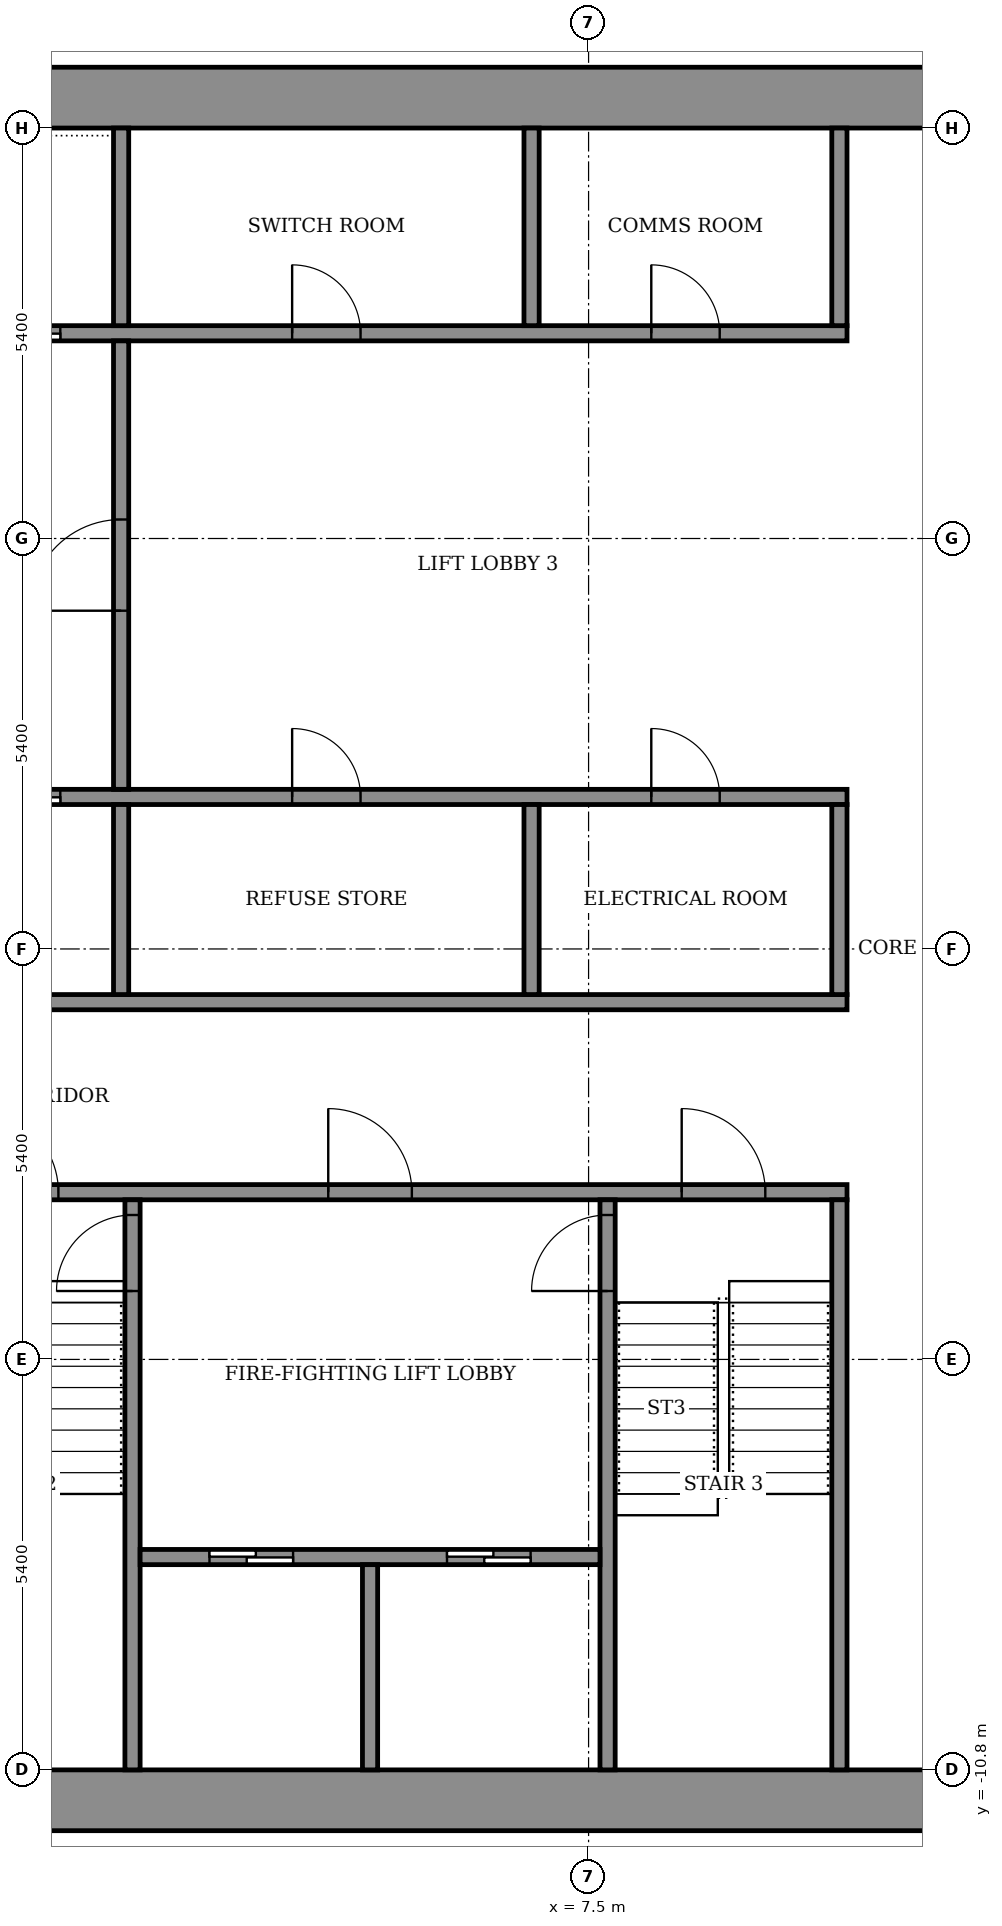
"""IFC4 building model, lengths in metres.
Left out: names, types, materials, properties, quantities, classifications, styles, units other than length and angle.
Written with IfcOpenShell. Run it as: python <this file> out.ifc"""

import sys

from ifc_helpers import new_model, si_unit, direction, frame, frame_2d, origin, place, context, subcontext, project, spatial, rectangle, extrude, element, fill, save


model = new_model("IFC4")
c1 = context("Model", 3, precision=1e-05, world=origin(), true_north=direction((0.0, 1.0)))
c2 = subcontext(c1, "Body", "Model", "MODEL_VIEW")
j1 = project(units=[si_unit("LENGTHUNIT", "METRE"), si_unit("PLANEANGLEUNIT", "RADIAN")], contexts=[c1])
p1 = place(None, origin())
s1 = spatial("IfcSite", under=j1, at=p1, CompositionType="ELEMENT")
p2 = place(p1, origin())
s2 = spatial("IfcBuilding", under=s1, at=p2, CompositionType="ELEMENT")
p3 = place(p2, frame((0.0, 0.0, 249.1)))
s3 = spatial("IfcBuildingStorey", under=s2, at=p3, CompositionType="ELEMENT", Elevation=249.1)
for number, where, z_axis, x_axis in (
    (1, (-14.6, -11.2, 0.0), (0.0, 0.0, 1.0), (1.0, 0.0, 0.0)),
    (2, (-14.6, 11.2, 0.0), (0.0, 0.0, 1.0), (1.0, 0.0, 0.0)),
):
    element("IfcWall", number, at=place(p3, frame(where, z_axis=z_axis, x_axis=x_axis)), inside=s3, PredefinedType="SHEAR", context=c2, shape_type="SweptSolid", body=[
        extrude(rectangle(XDim=29.2, YDim=0.8, at=frame_2d((14.6, 0.0))), origin(), (0.0, 0.0, 1.0), 3.6),
    ])
p4 = place(p3, frame((-10.9, -3.2, 0.0), z_axis=(0.0, 0.0, 1.0), x_axis=(1.0, 0.0, 0.0)))
e3 = element("IfcWall", 3, at=p4, inside=s3, PredefinedType="SHEAR", context=c2, shape_type="SweptSolid", body=[
    extrude(rectangle(XDim=21.8, YDim=0.2, at=frame_2d((10.9, 0.0))), origin(), (0.0, 0.0, 1.0), 3.05),
])
p5 = place(p4, frame((1.075, 0.0, 0.0)))
e4 = element("IfcOpeningElement", 4, at=p5, cuts=e3, PredefinedType="OPENING", context=c2, shape_type="SweptSolid", body=[
    extrude(rectangle(XDim=1.1, YDim=2.1, at=frame_2d((0.55, 1.05))), frame((0.0, 0.11, 0.0), z_axis=(0.0, -1.0, 0.0), x_axis=(1.0, 0.0, 0.0)), (0.0, 0.0, 1.0), 0.22),
])
p6 = place(p4, frame((10.325, 0.0, 0.0)))
e5 = element("IfcOpeningElement", 5, at=p6, cuts=e3, PredefinedType="OPENING", context=c2, shape_type="SweptSolid", body=[
    extrude(rectangle(XDim=1.1, YDim=2.1, at=frame_2d((0.55, 1.05))), frame((0.0, 0.11, 0.0), z_axis=(0.0, -1.0, 0.0), x_axis=(1.0, 0.0, 0.0)), (0.0, 0.0, 1.0), 0.22),
])
p7 = place(p4, frame((19.625, 0.0, 0.0)))
e6 = element("IfcOpeningElement", 6, at=p7, cuts=e3, PredefinedType="OPENING", context=c2, shape_type="SweptSolid", body=[
    extrude(rectangle(XDim=1.1, YDim=2.1, at=frame_2d((0.55, 1.05))), frame((0.0, 0.11, 0.0), z_axis=(0.0, -1.0, 0.0), x_axis=(1.0, 0.0, 0.0)), (0.0, 0.0, 1.0), 0.22),
])
p8 = place(p4, frame((5.7, 0.0, 0.0)))
e7 = element("IfcOpeningElement", 7, at=p8, cuts=e3, PredefinedType="OPENING", context=c2, shape_type="SweptSolid", body=[
    extrude(rectangle(XDim=1.1, YDim=2.1, at=frame_2d((0.55, 1.05))), frame((0.0, 0.11, 0.0), z_axis=(0.0, -1.0, 0.0), x_axis=(1.0, 0.0, 0.0)), (0.0, 0.0, 1.0), 0.22),
])
p9 = place(p4, frame((14.975, 0.0, 0.0)))
e8 = element("IfcOpeningElement", 8, at=p9, cuts=e3, PredefinedType="OPENING", context=c2, shape_type="SweptSolid", body=[
    extrude(rectangle(XDim=1.1, YDim=2.1, at=frame_2d((0.55, 1.05))), frame((0.0, 0.11, 0.0), z_axis=(0.0, -1.0, 0.0), x_axis=(1.0, 0.0, 0.0)), (0.0, 0.0, 1.0), 0.22),
])
p10 = place(p3, frame((-10.9, -0.7, 0.0), z_axis=(0.0, 0.0, 1.0), x_axis=(1.0, 0.0, 0.0)))
e9 = element("IfcWall", 9, at=p10, inside=s3, PredefinedType="SHEAR", context=c2, shape_type="SweptSolid", body=[
    extrude(rectangle(XDim=21.8, YDim=0.2, at=frame_2d((10.9, 0.0))), origin(), (0.0, 0.0, 1.0), 3.05),
])
p11 = place(p3, frame((-10.9, 2.0, 0.0), z_axis=(0.0, 0.0, 1.0), x_axis=(1.0, 0.0, 0.0)))
e10 = element("IfcWall", 10, at=p11, inside=s3, PredefinedType="SHEAR", context=c2, shape_type="SweptSolid", body=[
    extrude(rectangle(XDim=21.8, YDim=0.2, at=frame_2d((10.9, 0.0))), origin(), (0.0, 0.0, 1.0), 3.05),
])
p12 = place(p11, frame((4.95, 0.0, 0.0)))
e11 = element("IfcOpeningElement", 11, at=p12, cuts=e10, PredefinedType="OPENING", context=c2, shape_type="SweptSolid", body=[
    extrude(rectangle(XDim=1.1, YDim=2.1, at=frame_2d((0.55, 1.05))), frame((0.0, 0.11, 0.0), z_axis=(0.0, -1.0, 0.0), x_axis=(1.0, 0.0, 0.0)), (0.0, 0.0, 1.0), 0.22),
])
p13 = place(p11, frame((7.65, 0.0, 0.0)))
e12 = element("IfcOpeningElement", 12, at=p13, cuts=e10, PredefinedType="OPENING", context=c2, shape_type="SweptSolid", body=[
    extrude(rectangle(XDim=1.1, YDim=2.1, at=frame_2d((0.55, 1.05))), frame((0.0, 0.11, 0.0), z_axis=(0.0, -1.0, 0.0), x_axis=(1.0, 0.0, 0.0)), (0.0, 0.0, 1.0), 0.22),
])
p14 = place(p11, frame((10.35, 0.0, 0.0)))
e13 = element("IfcOpeningElement", 13, at=p14, cuts=e10, PredefinedType="OPENING", context=c2, shape_type="SweptSolid", body=[
    extrude(rectangle(XDim=1.1, YDim=2.1, at=frame_2d((0.55, 1.05))), frame((0.0, 0.11, 0.0), z_axis=(0.0, -1.0, 0.0), x_axis=(1.0, 0.0, 0.0)), (0.0, 0.0, 1.0), 0.22),
])
p15 = place(p11, frame((1.675, 0.0, 0.0)))
e14 = element("IfcOpeningElement", 14, at=p15, cuts=e10, PredefinedType="OPENING", context=c2, shape_type="SweptSolid", body=[
    extrude(rectangle(XDim=0.9, YDim=2.1, at=frame_2d((0.45, 1.05))), frame((0.0, 0.11, 0.0), z_axis=(0.0, -1.0, 0.0), x_axis=(1.0, 0.0, 0.0)), (0.0, 0.0, 1.0), 0.22),
])
p16 = place(p11, frame((14.5, 0.0, 0.0)))
e15 = element("IfcOpeningElement", 15, at=p16, cuts=e10, PredefinedType="OPENING", context=c2, shape_type="SweptSolid", body=[
    extrude(rectangle(XDim=0.9, YDim=2.1, at=frame_2d((0.45, 1.05))), frame((0.0, 0.11, 0.0), z_axis=(0.0, -1.0, 0.0), x_axis=(1.0, 0.0, 0.0)), (0.0, 0.0, 1.0), 0.22),
])
p17 = place(p11, frame((19.225, 0.0, 0.0)))
e16 = element("IfcOpeningElement", 16, at=p17, cuts=e10, PredefinedType="OPENING", context=c2, shape_type="SweptSolid", body=[
    extrude(rectangle(XDim=0.9, YDim=2.1, at=frame_2d((0.45, 1.05))), frame((0.0, 0.11, 0.0), z_axis=(0.0, -1.0, 0.0), x_axis=(1.0, 0.0, 0.0)), (0.0, 0.0, 1.0), 0.22),
])
p18 = place(p3, frame((-10.9, 8.1, 0.0), z_axis=(0.0, 0.0, 1.0), x_axis=(1.0, 0.0, 0.0)))
e17 = element("IfcWall", 17, at=p18, inside=s3, PredefinedType="SHEAR", context=c2, shape_type="SweptSolid", body=[
    extrude(rectangle(XDim=21.8, YDim=0.2, at=frame_2d((10.9, 0.0))), origin(), (0.0, 0.0, 1.0), 3.05),
])
p19 = place(p18, frame((4.95, 0.0, 0.0)))
e18 = element("IfcOpeningElement", 18, at=p19, cuts=e17, PredefinedType="OPENING", context=c2, shape_type="SweptSolid", body=[
    extrude(rectangle(XDim=1.1, YDim=2.1, at=frame_2d((0.55, 1.05))), frame((0.0, 0.11, 0.0), z_axis=(0.0, -1.0, 0.0), x_axis=(1.0, 0.0, 0.0)), (0.0, 0.0, 1.0), 0.22),
])
p20 = place(p18, frame((7.65, 0.0, 0.0)))
e19 = element("IfcOpeningElement", 19, at=p20, cuts=e17, PredefinedType="OPENING", context=c2, shape_type="SweptSolid", body=[
    extrude(rectangle(XDim=1.1, YDim=2.1, at=frame_2d((0.55, 1.05))), frame((0.0, 0.11, 0.0), z_axis=(0.0, -1.0, 0.0), x_axis=(1.0, 0.0, 0.0)), (0.0, 0.0, 1.0), 0.22),
])
p21 = place(p18, frame((10.35, 0.0, 0.0)))
e20 = element("IfcOpeningElement", 20, at=p21, cuts=e17, PredefinedType="OPENING", context=c2, shape_type="SweptSolid", body=[
    extrude(rectangle(XDim=1.1, YDim=2.1, at=frame_2d((0.55, 1.05))), frame((0.0, 0.11, 0.0), z_axis=(0.0, -1.0, 0.0), x_axis=(1.0, 0.0, 0.0)), (0.0, 0.0, 1.0), 0.22),
])
p22 = place(p18, frame((1.675, 0.0, 0.0)))
e21 = element("IfcOpeningElement", 21, at=p22, cuts=e17, PredefinedType="OPENING", context=c2, shape_type="SweptSolid", body=[
    extrude(rectangle(XDim=0.9, YDim=2.1, at=frame_2d((0.45, 1.05))), frame((0.0, 0.11, 0.0), z_axis=(0.0, -1.0, 0.0), x_axis=(1.0, 0.0, 0.0)), (0.0, 0.0, 1.0), 0.22),
])
p23 = place(p18, frame((14.5, 0.0, 0.0)))
e22 = element("IfcOpeningElement", 22, at=p23, cuts=e17, PredefinedType="OPENING", context=c2, shape_type="SweptSolid", body=[
    extrude(rectangle(XDim=0.9, YDim=2.1, at=frame_2d((0.45, 1.05))), frame((0.0, 0.11, 0.0), z_axis=(0.0, -1.0, 0.0), x_axis=(1.0, 0.0, 0.0)), (0.0, 0.0, 1.0), 0.22),
])
p24 = place(p18, frame((19.225, 0.0, 0.0)))
e23 = element("IfcOpeningElement", 23, at=p24, cuts=e17, PredefinedType="OPENING", context=c2, shape_type="SweptSolid", body=[
    extrude(rectangle(XDim=0.9, YDim=2.1, at=frame_2d((0.45, 1.05))), frame((0.0, 0.11, 0.0), z_axis=(0.0, -1.0, 0.0), x_axis=(1.0, 0.0, 0.0)), (0.0, 0.0, 1.0), 0.22),
])
p25 = place(p3, frame((1.5, -10.8, 0.0), z_axis=(0.0, 0.0, 1.0), x_axis=(0.0, 1.0, 0.0)))
e24 = element("IfcWall", 24, at=p25, inside=s3, PredefinedType="SHEAR", context=c2, shape_type="SweptSolid", body=[
    extrude(rectangle(XDim=7.5, YDim=0.2, at=frame_2d((3.75, 0.0))), origin(), (0.0, 0.0, 1.0), 3.05),
])
p26 = place(p25, frame((6.3, 0.0, 0.0)))
e25 = element("IfcOpeningElement", 25, at=p26, cuts=e24, PredefinedType="OPENING", context=c2, shape_type="SweptSolid", body=[
    extrude(rectangle(XDim=1.0, YDim=2.1, at=frame_2d((0.5, 1.05))), frame((0.0, 0.11, 0.0), z_axis=(0.0, -1.0, 0.0), x_axis=(1.0, 0.0, 0.0)), (0.0, 0.0, 1.0), 0.22),
])
p27 = place(p3, frame((7.75, -10.8, 0.0), z_axis=(0.0, 0.0, 1.0), x_axis=(0.0, 1.0, 0.0)))
e26 = element("IfcWall", 26, at=p27, inside=s3, PredefinedType="SHEAR", context=c2, shape_type="SweptSolid", body=[
    extrude(rectangle(XDim=7.5, YDim=0.2, at=frame_2d((3.75, 0.0))), origin(), (0.0, 0.0, 1.0), 3.05),
])
p28 = place(p27, frame((6.3, 0.0, 0.0)))
e27 = element("IfcOpeningElement", 27, at=p28, cuts=e26, PredefinedType="OPENING", context=c2, shape_type="SweptSolid", body=[
    extrude(rectangle(XDim=1.0, YDim=2.1, at=frame_2d((0.5, 1.05))), frame((0.0, 0.11, 0.0), z_axis=(0.0, -1.0, 0.0), x_axis=(1.0, 0.0, 0.0)), (0.0, 0.0, 1.0), 0.22),
])
p29 = place(p3, frame((10.8, -10.8, 0.0), z_axis=(0.0, 0.0, 1.0), x_axis=(0.0, 1.0, 0.0)))
e28 = element("IfcWall", 28, at=p29, inside=s3, PredefinedType="SHEAR", context=c2, shape_type="SweptSolid", body=[
    extrude(rectangle(XDim=7.5, YDim=0.2, at=frame_2d((3.75, 0.0))), origin(), (0.0, 0.0, 1.0), 3.05),
])
p30 = place(p3, frame((1.6, -8.0, 0.0), z_axis=(0.0, 0.0, 1.0), x_axis=(1.0, 0.0, 0.0)))
e29 = element("IfcWall", 29, at=p30, inside=s3, PredefinedType="SHEAR", context=c2, shape_type="SweptSolid", body=[
    extrude(rectangle(XDim=6.05, YDim=0.2, at=frame_2d((3.025, 0.0))), origin(), (0.0, 0.0, 1.0), 3.05),
])
p31 = place(p30, frame((0.913, 0.0, 0.0)))
e30 = element("IfcOpeningElement", 30, at=p31, cuts=e29, PredefinedType="OPENING", context=c2, shape_type="SweptSolid", body=[
    extrude(rectangle(XDim=1.1, YDim=2.1, at=frame_2d((0.55, 1.05))), frame((0.0, 0.11, 0.0), z_axis=(0.0, -1.0, 0.0), x_axis=(1.0, 0.0, 0.0)), (0.0, 0.0, 1.0), 0.22),
])
p32 = place(p30, frame((4.038, 0.0, 0.0)))
e31 = element("IfcOpeningElement", 31, at=p32, cuts=e29, PredefinedType="OPENING", context=c2, shape_type="SweptSolid", body=[
    extrude(rectangle(XDim=1.1, YDim=2.1, at=frame_2d((0.55, 1.05))), frame((0.0, 0.11, 0.0), z_axis=(0.0, -1.0, 0.0), x_axis=(1.0, 0.0, 0.0)), (0.0, 0.0, 1.0), 0.22),
])
p33 = place(p3, frame((4.625, -10.8, 0.0), z_axis=(0.0, 0.0, 1.0), x_axis=(0.0, 1.0, 0.0)))
e32 = element("IfcWall", 32, at=p33, inside=s3, PredefinedType="SHEAR", context=c2, shape_type="SweptSolid", body=[
    extrude(rectangle(XDim=2.7, YDim=0.2, at=frame_2d((1.35, 0.0))), origin(), (0.0, 0.0, 1.0), 3.05),
])
p34 = place(p3, frame((1.35, -0.6, 0.0), z_axis=(0.0, 0.0, 1.0), x_axis=(0.0, 1.0, 0.0)))
e33 = element("IfcWall", 33, at=p34, inside=s3, PredefinedType="SHEAR", context=c2, shape_type="SweptSolid", body=[
    extrude(rectangle(XDim=2.5, YDim=0.2, at=frame_2d((1.25, 0.0))), origin(), (0.0, 0.0, 1.0), 3.05),
])
for number, where, z_axis, x_axis in (
    (34, (6.75, -0.6, 0.0), (0.0, 0.0, 1.0), (0.0, 1.0, 0.0)),
    (35, (10.8, -0.6, 0.0), (0.0, 0.0, 1.0), (0.0, 1.0, 0.0)),
):
    element("IfcWall", number, at=place(p3, frame(where, z_axis=z_axis, x_axis=x_axis)), inside=s3, PredefinedType="STANDARD", context=c2, shape_type="SweptSolid", body=[
        extrude(rectangle(XDim=2.5, YDim=0.2, at=frame_2d((1.25, 0.0))), origin(), (0.0, 0.0, 1.0), 3.05),
    ])
p35 = place(p3, frame((1.35, 8.2, 0.0), z_axis=(0.0, 0.0, 1.0), x_axis=(0.0, 1.0, 0.0)))
e36 = element("IfcWall", 36, at=p35, inside=s3, PredefinedType="SHEAR", context=c2, shape_type="SweptSolid", body=[
    extrude(rectangle(XDim=2.6, YDim=0.2, at=frame_2d((1.3, 0.0))), origin(), (0.0, 0.0, 1.0), 3.05),
])
for number, where, z_axis, x_axis in (
    (37, (6.75, 8.2, 0.0), (0.0, 0.0, 1.0), (0.0, 1.0, 0.0)),
    (38, (10.8, 8.2, 0.0), (0.0, 0.0, 1.0), (0.0, 1.0, 0.0)),
):
    element("IfcWall", number, at=place(p3, frame(where, z_axis=z_axis, x_axis=x_axis)), inside=s3, PredefinedType="STANDARD", context=c2, shape_type="SweptSolid", body=[
        extrude(rectangle(XDim=2.6, YDim=0.2, at=frame_2d((1.3, 0.0))), origin(), (0.0, 0.0, 1.0), 3.05),
    ])
p36 = place(p3, frame((1.35, 2.1, 0.0), z_axis=(0.0, 0.0, 1.0), x_axis=(0.0, 1.0, 0.0)))
e39 = element("IfcWall", 39, at=p36, inside=s3, PredefinedType="STANDARD", context=c2, shape_type="SweptSolid", body=[
    extrude(rectangle(XDim=5.9, YDim=0.2, at=frame_2d((2.95, 0.0))), origin(), (0.0, 0.0, 1.0), 3.05),
])
p37 = place(p36, frame((2.35, 0.0, 0.0)))
e40 = element("IfcOpeningElement", 40, at=p37, cuts=e39, PredefinedType="OPENING", context=c2, shape_type="SweptSolid", body=[
    extrude(rectangle(XDim=1.2, YDim=2.1, at=frame_2d((0.6, 1.05))), frame((0.0, 0.11, 0.0), z_axis=(0.0, -1.0, 0.0), x_axis=(1.0, 0.0, 0.0)), (0.0, 0.0, 1.0), 0.22),
])
p38 = place(p14, origin())
e41 = element("IfcDoor", 41, at=p38, inside=s3, OperationType="SLIDING_TO_LEFT", PredefinedType="DOOR", context=c2, shape_type="SweptSolid", body=[
    extrude(rectangle(XDim=1.1, YDim=2.1, at=frame_2d((0.55, 1.05))), frame((0.0, 0.025, 0.0), z_axis=(0.0, -1.0, 0.0), x_axis=(1.0, 0.0, 0.0)), (0.0, 0.0, 1.0), 0.05),
])
fill(e13, e41)
p39 = place(p21, origin())
e42 = element("IfcDoor", 42, at=p39, inside=s3, OperationType="SLIDING_TO_LEFT", PredefinedType="DOOR", context=c2, shape_type="SweptSolid", body=[
    extrude(rectangle(XDim=1.1, YDim=2.1, at=frame_2d((0.55, 1.05))), frame((0.0, 0.025, 0.0), z_axis=(0.0, -1.0, 0.0), x_axis=(1.0, 0.0, 0.0)), (0.0, 0.0, 1.0), 0.05),
])
fill(e20, e42)
p40 = place(p16, origin())
e43 = element("IfcDoor", 43, at=p40, inside=s3, OperationType="SINGLE_SWING_RIGHT", PredefinedType="DOOR", context=c2, shape_type="SweptSolid", body=[
    extrude(rectangle(XDim=0.9, YDim=2.1, at=frame_2d((0.45, 1.05))), frame((0.0, 0.025, 0.0), z_axis=(0.0, -1.0, 0.0), x_axis=(1.0, 0.0, 0.0)), (0.0, 0.0, 1.0), 0.05),
])
fill(e15, e43)
p41 = place(p17, origin())
e44 = element("IfcDoor", 44, at=p41, inside=s3, OperationType="SINGLE_SWING_LEFT", PredefinedType="DOOR", context=c2, shape_type="SweptSolid", body=[
    extrude(rectangle(XDim=0.9, YDim=2.1, at=frame_2d((0.45, 1.05))), frame((0.0, 0.025, 0.0), z_axis=(0.0, -1.0, 0.0), x_axis=(1.0, 0.0, 0.0)), (0.0, 0.0, 1.0), 0.05),
])
fill(e16, e44)
p42 = place(p23, origin())
e45 = element("IfcDoor", 45, at=p42, inside=s3, OperationType="SINGLE_SWING_LEFT", PredefinedType="DOOR", context=c2, shape_type="SweptSolid", body=[
    extrude(rectangle(XDim=0.9, YDim=2.1, at=frame_2d((0.45, 1.05))), frame((0.0, 0.025, 0.0), z_axis=(0.0, -1.0, 0.0), x_axis=(1.0, 0.0, 0.0)), (0.0, 0.0, 1.0), 0.05),
])
fill(e22, e45)
p43 = place(p24, origin())
e46 = element("IfcDoor", 46, at=p43, inside=s3, OperationType="SINGLE_SWING_LEFT", PredefinedType="DOOR", context=c2, shape_type="SweptSolid", body=[
    extrude(rectangle(XDim=0.9, YDim=2.1, at=frame_2d((0.45, 1.05))), frame((0.0, 0.025, 0.0), z_axis=(0.0, -1.0, 0.0), x_axis=(1.0, 0.0, 0.0)), (0.0, 0.0, 1.0), 0.05),
])
fill(e23, e46)
p44 = place(p31, origin())
e47 = element("IfcDoor", 47, at=p44, inside=s3, OperationType="SLIDING_TO_LEFT", PredefinedType="DOOR", context=c2, shape_type="SweptSolid", body=[
    extrude(rectangle(XDim=1.1, YDim=2.1, at=frame_2d((0.55, 1.05))), frame((0.0, 0.025, 0.0), z_axis=(0.0, -1.0, 0.0), x_axis=(1.0, 0.0, 0.0)), (0.0, 0.0, 1.0), 0.05),
])
fill(e30, e47)
p45 = place(p32, origin())
e48 = element("IfcDoor", 48, at=p45, inside=s3, OperationType="SLIDING_TO_LEFT", PredefinedType="DOOR", context=c2, shape_type="SweptSolid", body=[
    extrude(rectangle(XDim=1.1, YDim=2.1, at=frame_2d((0.55, 1.05))), frame((0.0, 0.025, 0.0), z_axis=(0.0, -1.0, 0.0), x_axis=(1.0, 0.0, 0.0)), (0.0, 0.0, 1.0), 0.05),
])
fill(e31, e48)
p46 = place(p6, origin())
e49 = element("IfcDoor", 49, at=p46, inside=s3, OperationType="SINGLE_SWING_RIGHT", PredefinedType="DOOR", context=c2, shape_type="SweptSolid", body=[
    extrude(rectangle(XDim=1.1, YDim=2.1, at=frame_2d((0.55, 1.05))), frame((0.0, 0.025, 0.0), z_axis=(0.0, -1.0, 0.0), x_axis=(1.0, 0.0, 0.0)), (0.0, 0.0, 1.0), 0.05),
])
fill(e5, e49)
p47 = place(p7, origin())
e50 = element("IfcDoor", 50, at=p47, inside=s3, OperationType="SINGLE_SWING_RIGHT", PredefinedType="DOOR", context=c2, shape_type="SweptSolid", body=[
    extrude(rectangle(XDim=1.1, YDim=2.1, at=frame_2d((0.55, 1.05))), frame((0.0, 0.025, 0.0), z_axis=(0.0, -1.0, 0.0), x_axis=(1.0, 0.0, 0.0)), (0.0, 0.0, 1.0), 0.05),
])
fill(e6, e50)
p48 = place(p9, origin())
e51 = element("IfcDoor", 51, at=p48, inside=s3, OperationType="SINGLE_SWING_LEFT", PredefinedType="DOOR", context=c2, shape_type="SweptSolid", body=[
    extrude(rectangle(XDim=1.1, YDim=2.1, at=frame_2d((0.55, 1.05))), frame((0.0, 0.025, 0.0), z_axis=(0.0, -1.0, 0.0), x_axis=(1.0, 0.0, 0.0)), (0.0, 0.0, 1.0), 0.05),
])
fill(e8, e51)
p49 = place(p26, origin())
e52 = element("IfcDoor", 52, at=p49, inside=s3, OperationType="SINGLE_SWING_RIGHT", PredefinedType="DOOR", context=c2, shape_type="SweptSolid", body=[
    extrude(rectangle(XDim=1.0, YDim=2.1, at=frame_2d((0.5, 1.05))), frame((0.0, 0.025, 0.0), z_axis=(0.0, -1.0, 0.0), x_axis=(1.0, 0.0, 0.0)), (0.0, 0.0, 1.0), 0.05),
])
fill(e25, e52)
p50 = place(p28, origin())
e53 = element("IfcDoor", 53, at=p50, inside=s3, OperationType="SINGLE_SWING_RIGHT", PredefinedType="DOOR", context=c2, shape_type="SweptSolid", body=[
    extrude(rectangle(XDim=1.0, YDim=2.1, at=frame_2d((0.5, 1.05))), frame((0.0, 0.025, 0.0), z_axis=(0.0, -1.0, 0.0), x_axis=(1.0, 0.0, 0.0)), (0.0, 0.0, 1.0), 0.05),
])
fill(e27, e53)
p51 = place(p37, origin())
e54 = element("IfcDoor", 54, at=p51, inside=s3, OperationType="SINGLE_SWING_LEFT", PredefinedType="DOOR", context=c2, shape_type="SweptSolid", body=[
    extrude(rectangle(XDim=1.2, YDim=2.1, at=frame_2d((0.6, 1.05))), frame((0.0, 0.025, 0.0), z_axis=(0.0, -1.0, 0.0), x_axis=(1.0, 0.0, 0.0)), (0.0, 0.0, 1.0), 0.05),
])
fill(e40, e54)
save(model, sys.argv[1])
